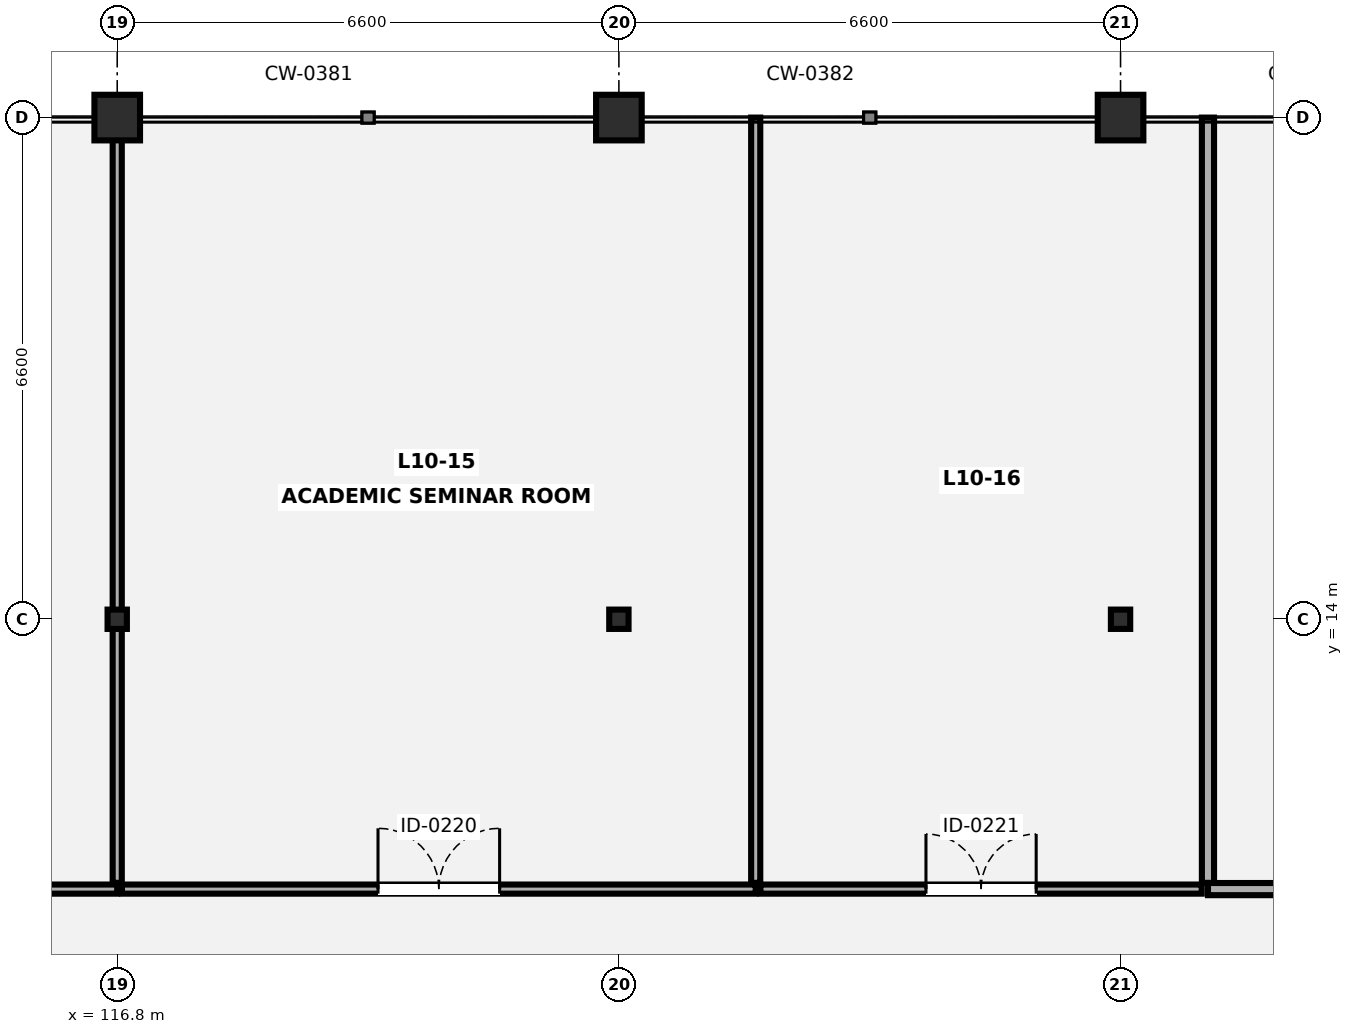
"""IFC4 building model, lengths in metres.
Left out: names, types, materials, properties, quantities, classifications, styles, units other than length and angle.
Written with IfcOpenShell. Run it as: python <this file> out.ifc"""

import sys

from ifc_helpers import new_model, si_unit, direction, frame, frame_2d, origin, origin_2d, place, context, subcontext, project, spatial, rectangle, circle, i_section, extrude, element, fill, save


model = new_model("IFC4")
c1 = context("Model", 3, precision=1e-05, world=origin(), true_north=direction((0.0, 1.0)))
c2 = subcontext(c1, "Body", "Model", "MODEL_VIEW")
j1 = project(units=[si_unit("LENGTHUNIT", "METRE"), si_unit("PLANEANGLEUNIT", "RADIAN")], contexts=[c1])
p1 = place(None, origin())
s1 = spatial("IfcSite", under=j1, at=p1, CompositionType="ELEMENT")
p2 = place(p1, origin())
s2 = spatial("IfcBuilding", under=s1, at=p2, CompositionType="ELEMENT")
p3 = place(p2, frame((0.0, 0.0, 42.0)))
s3 = spatial("IfcBuildingStorey", under=s2, at=p3, CompositionType="ELEMENT", Elevation=42.0)
p4 = place(p3, frame((116.8, 14.0, 0.0), z_axis=(0.0, 0.0, 1.0), x_axis=(1.0, 0.0, 0.0)))
e1 = element("IfcColumn", 1, at=p4, inside=s3, PredefinedType="COLUMN", context=c2, shape_type="SweptSolid", body=[
    extrude(i_section(OverallWidth=0.254, OverallDepth=0.254, WebThickness=0.009, FlangeThickness=0.014, FilletRadius=0.014, at=origin_2d()), origin(), (0.0, 0.0, 1.0), 3.85),
])
p5 = place(p3, frame((116.8, 20.6, 0.0), z_axis=(0.0, 0.0, 1.0), x_axis=(1.0, 0.0, 0.0)))
e2 = element("IfcColumn", 2, at=p5, inside=s3, PredefinedType="PILASTER", context=c2, shape_type="SweptSolid", body=[
    extrude(circle(Radius=0.3, at=origin_2d()), origin(), (0.0, 0.0, 1.0), 3.85),
])
p6 = place(p3, frame((123.4, 14.0, 0.0), z_axis=(0.0, 0.0, 1.0), x_axis=(1.0, 0.0, 0.0)))
e3 = element("IfcColumn", 3, at=p6, inside=s3, PredefinedType="COLUMN", context=c2, shape_type="SweptSolid", body=[
    extrude(i_section(OverallWidth=0.254, OverallDepth=0.254, WebThickness=0.009, FlangeThickness=0.014, FilletRadius=0.014, at=origin_2d()), origin(), (0.0, 0.0, 1.0), 3.85),
])
p7 = place(p3, frame((123.4, 20.6, 0.0), z_axis=(0.0, 0.0, 1.0), x_axis=(1.0, 0.0, 0.0)))
e4 = element("IfcColumn", 4, at=p7, inside=s3, PredefinedType="PILASTER", context=c2, shape_type="SweptSolid", body=[
    extrude(circle(Radius=0.3, at=origin_2d()), origin(), (0.0, 0.0, 1.0), 3.85),
])
p8 = place(p3, frame((130.0, 14.0, 0.0), z_axis=(0.0, 0.0, 1.0), x_axis=(1.0, 0.0, 0.0)))
e5 = element("IfcColumn", 5, at=p8, inside=s3, PredefinedType="COLUMN", context=c2, shape_type="SweptSolid", body=[
    extrude(i_section(OverallWidth=0.254, OverallDepth=0.254, WebThickness=0.009, FlangeThickness=0.014, FilletRadius=0.014, at=origin_2d()), origin(), (0.0, 0.0, 1.0), 3.85),
])
p9 = place(p3, frame((130.0, 20.6, 0.0), z_axis=(0.0, 0.0, 1.0), x_axis=(1.0, 0.0, 0.0)))
e6 = element("IfcColumn", 6, at=p9, inside=s3, PredefinedType="PILASTER", context=c2, shape_type="SweptSolid", body=[
    extrude(circle(Radius=0.3, at=origin_2d()), origin(), (0.0, 0.0, 1.0), 3.85),
])
p10 = place(p3, frame((131.15, 10.45, 0.0), z_axis=(0.0, 0.0, 1.0), x_axis=(1.0, 0.0, 0.0)))
e7 = element("IfcWall", 7, at=p10, inside=s3, PredefinedType="PARTITIONING", context=c2, shape_type="SweptSolid", body=[
    extrude(rectangle(XDim=5.45, YDim=0.16, at=frame_2d((2.725, 0.0))), origin(), (0.0, 0.0, 1.0), 3.196),
])
p11 = place(p10, frame((2.275, 0.0, 0.0)))
e8 = element("IfcOpeningElement", 8, at=p11, cuts=e7, PredefinedType="OPENING", context=c2, shape_type="SweptSolid", body=[
    extrude(rectangle(XDim=0.9, YDim=2.1, at=frame_2d((0.45, 1.05))), frame((0.0, 0.09, 0.0), z_axis=(0.0, -1.0, 0.0), x_axis=(1.0, 0.0, 0.0)), (0.0, 0.0, 1.0), 0.18),
])
p12 = place(p3, frame((131.15, 10.532, 0.0), z_axis=(0.0, 0.0, 1.0), x_axis=(0.0, 1.0, 0.0)))
e9 = element("IfcWall", 9, at=p12, inside=s3, PredefinedType="PARTITIONING", context=c2, shape_type="SweptSolid", body=[
    extrude(rectangle(XDim=10.068, YDim=0.16, at=frame_2d((5.034, 0.0))), origin(), (0.0, 0.0, 1.0), 3.67),
])
p13 = place(p3, frame((109.162, 10.45, 0.0), z_axis=(0.0, 0.0, 1.0), x_axis=(1.0, 0.0, 0.0)))
e10 = element("IfcWall", 10, at=p13, inside=s3, PredefinedType="PARTITIONING", context=c2, shape_type="SweptSolid", body=[
    extrude(rectangle(XDim=7.638, YDim=0.12, at=frame_2d((3.819, 0.0))), origin(), (0.0, 0.0, 1.0), 3.196),
])
p14 = place(p13, frame((3.344, 0.0, 0.0)))
e11 = element("IfcOpeningElement", 11, at=p14, cuts=e10, PredefinedType="OPENING", context=c2, shape_type="SweptSolid", body=[
    extrude(rectangle(XDim=0.95, YDim=2.1, at=frame_2d((0.475, 1.05))), frame((0.0, 0.07, 0.0), z_axis=(0.0, -1.0, 0.0), x_axis=(1.0, 0.0, 0.0)), (0.0, 0.0, 1.0), 0.14),
])
p15 = place(p3, frame((116.8, 10.532, 0.0), z_axis=(0.0, 0.0, 1.0), x_axis=(0.0, 1.0, 0.0)))
e12 = element("IfcWall", 12, at=p15, inside=s3, PredefinedType="PARTITIONING", context=c2, shape_type="SweptSolid", body=[
    extrude(rectangle(XDim=10.068, YDim=0.12, at=frame_2d((5.034, 0.0))), origin(), (0.0, 0.0, 1.0), 3.022),
])
p16 = place(p3, frame((116.862, 10.45, 0.0), z_axis=(0.0, 0.0, 1.0), x_axis=(1.0, 0.0, 0.0)))
e13 = element("IfcWall", 13, at=p16, inside=s3, PredefinedType="PARTITIONING", context=c2, shape_type="SweptSolid", body=[
    extrude(rectangle(XDim=8.338, YDim=0.12, at=frame_2d((4.169, 0.0))), origin(), (0.0, 0.0, 1.0), 3.196),
])
p17 = place(p16, frame((3.369, 0.0, 0.0)))
e14 = element("IfcOpeningElement", 14, at=p17, cuts=e13, PredefinedType="OPENING", context=c2, shape_type="SweptSolid", body=[
    extrude(rectangle(XDim=1.6, YDim=2.18, at=frame_2d((0.8, 1.09))), frame((0.0, 0.07, 0.0), z_axis=(0.0, -1.0, 0.0), x_axis=(1.0, 0.0, 0.0)), (0.0, 0.0, 1.0), 0.14),
])
p18 = place(p3, frame((125.2, 10.532, 0.0), z_axis=(0.0, 0.0, 1.0), x_axis=(0.0, 1.0, 0.0)))
e15 = element("IfcWall", 15, at=p18, inside=s3, PredefinedType="PARTITIONING", context=c2, shape_type="SweptSolid", body=[
    extrude(rectangle(XDim=10.068, YDim=0.12, at=frame_2d((5.034, 0.0))), origin(), (0.0, 0.0, 1.0), 3.67),
])
p19 = place(p3, frame((125.262, 10.45, 0.0), z_axis=(0.0, 0.0, 1.0), x_axis=(1.0, 0.0, 0.0)))
e16 = element("IfcWall", 16, at=p19, inside=s3, PredefinedType="PARTITIONING", context=c2, shape_type="SweptSolid", body=[
    extrude(rectangle(XDim=5.806, YDim=0.12, at=frame_2d((2.903, 0.0))), origin(), (0.0, 0.0, 1.0), 3.196),
])
p20 = place(p19, frame((2.178, 0.0, 0.0)))
e17 = element("IfcOpeningElement", 17, at=p20, cuts=e16, PredefinedType="OPENING", context=c2, shape_type="SweptSolid", body=[
    extrude(rectangle(XDim=1.45, YDim=2.12, at=frame_2d((0.725, 1.06))), frame((0.0, 0.07, 0.0), z_axis=(0.0, -1.0, 0.0), x_axis=(1.0, 0.0, 0.0)), (0.0, 0.0, 1.0), 0.14),
])
p21 = place(p17, origin())
e18 = element("IfcDoor", 18, at=p21, inside=s3, OperationType="DOUBLE_DOOR_SINGLE_SWING", PredefinedType="DOOR", context=c2, shape_type="SweptSolid", body=[
    extrude(rectangle(XDim=1.6, YDim=2.18, at=frame_2d((0.8, 1.09))), frame((0.0, 0.025, 0.0), z_axis=(0.0, -1.0, 0.0), x_axis=(1.0, 0.0, 0.0)), (0.0, 0.0, 1.0), 0.05),
])
fill(e14, e18)
p22 = place(p20, origin())
e19 = element("IfcDoor", 19, at=p22, inside=s3, OperationType="DOUBLE_DOOR_SINGLE_SWING", PredefinedType="DOOR", context=c2, shape_type="SweptSolid", body=[
    extrude(rectangle(XDim=1.45, YDim=2.12, at=frame_2d((0.725, 1.06))), frame((0.0, 0.025, 0.0), z_axis=(0.0, -1.0, 0.0), x_axis=(1.0, 0.0, 0.0)), (0.0, 0.0, 1.0), 0.05),
])
fill(e17, e19)
save(model, sys.argv[1])
